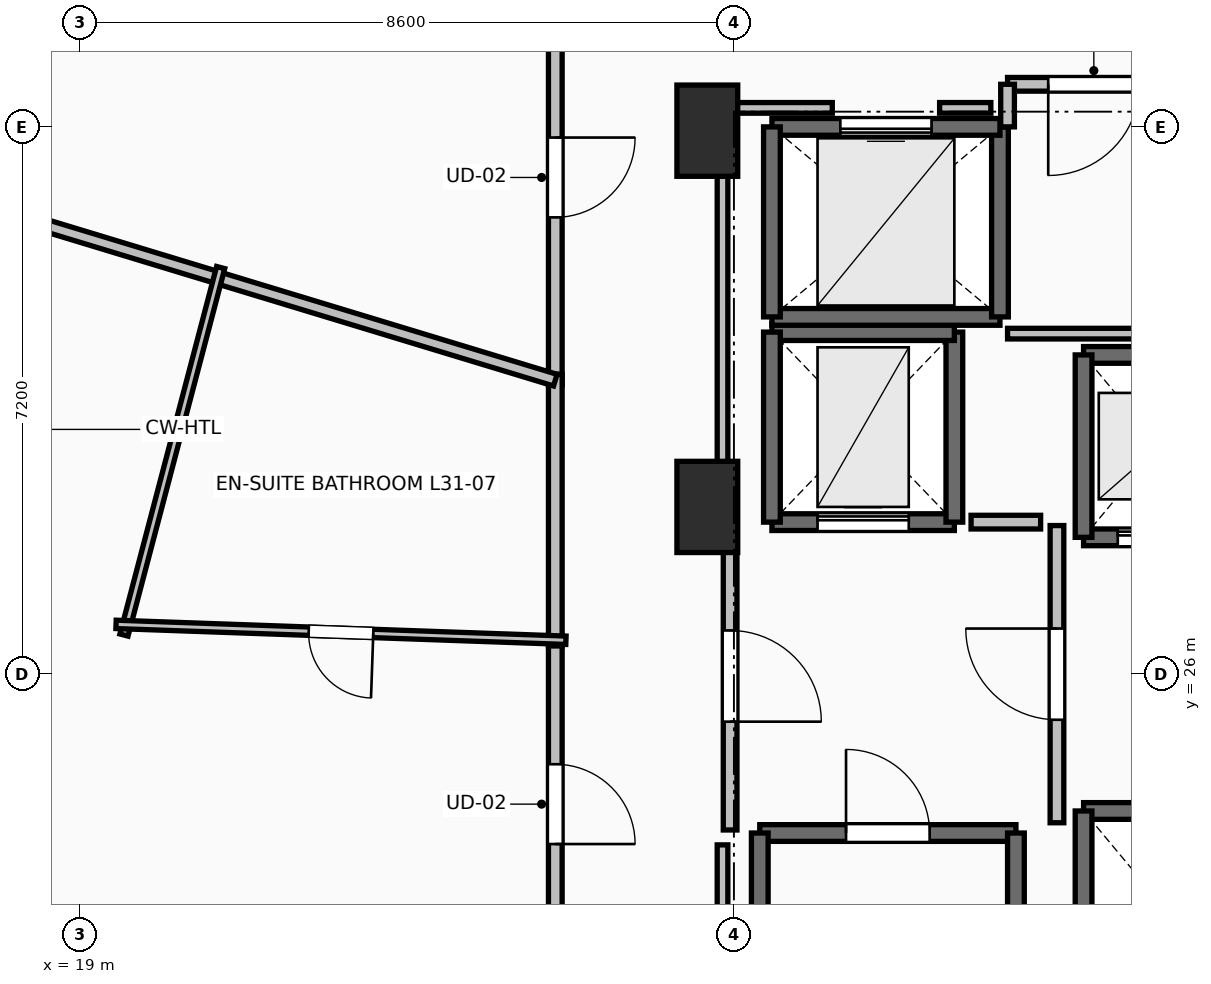
"""IFC4 building model, lengths in metres.
Left out: names, types, materials, properties, quantities, classifications, styles, units other than length and angle.
Written with IfcOpenShell. Run it as: python <this file> out.ifc"""

import sys

from ifc_helpers import new_model, si_unit, direction, frame, frame_2d, origin, origin_2d, place, context, subcontext, project, spatial, rectangle, extrude, element, fill, save


model = new_model("IFC4")
c1 = context("Model", 3, precision=1e-05, world=origin(), true_north=direction((0.0, 1.0)))
c2 = subcontext(c1, "Body", "Model", "MODEL_VIEW")
j1 = project(units=[si_unit("LENGTHUNIT", "METRE"), si_unit("PLANEANGLEUNIT", "RADIAN")], contexts=[c1])
p1 = place(None, origin())
s1 = spatial("IfcSite", under=j1, at=p1, CompositionType="ELEMENT")
p2 = place(p1, origin())
s2 = spatial("IfcBuilding", under=s1, at=p2, CompositionType="ELEMENT")
p3 = place(p2, frame((0.0, 0.0, 117.3)))
s3 = spatial("IfcBuildingStorey", under=s2, at=p3, CompositionType="ELEMENT", Elevation=117.3)
for number, where, z_axis, x_axis in (
    (1, (27.25, 28.2, 0.0), (0.0, 0.0, 1.0), (1.0, 0.0, 0.0)),
    (2, (27.25, 33.15, 0.0), (0.0, 0.0, 1.0), (1.0, 0.0, 0.0)),
):
    element("IfcColumn", number, at=place(p3, frame(where, z_axis=z_axis, x_axis=x_axis)), inside=s3, PredefinedType="PILASTER", context=c2, shape_type="SweptSolid", body=[
        extrude(rectangle(XDim=0.8, YDim=1.2, at=origin_2d()), origin(), (0.0, 0.0, 1.0), 3.5),
    ])
p4 = place(p3, frame((27.94, 23.91, 0.0), z_axis=(0.0, 0.0, 1.0), x_axis=(1.0, 0.0, 0.0)))
e3 = element("IfcWall", 3, at=p4, inside=s3, PredefinedType="SOLIDWALL", context=c2, shape_type="SweptSolid", body=[
    extrude(rectangle(XDim=3.37, YDim=0.22, at=frame_2d((1.685, 0.0))), origin(), (0.0, 0.0, 1.0), 3.24),
])
p5 = place(p4, frame((1.135, 0.0, 0.0)))
e4 = element("IfcOpeningElement", 4, at=p5, cuts=e3, PredefinedType="OPENING", context=c2, shape_type="SweptSolid", body=[
    extrude(rectangle(XDim=1.1, YDim=2.15, at=frame_2d((0.55, 1.075))), frame((0.0, 0.125, 0.0), z_axis=(0.0, -1.0, 0.0), x_axis=(1.0, 0.0, 0.0)), (0.0, 0.0, 1.0), 0.25),
])
for number, where, z_axis, x_axis in (
    (5, (31.31, 23.91, 0.0), (0.0, 0.0, 1.0), (0.0, -1.0, 0.0)),
    (6, (27.94, 16.49, 0.0), (0.0, 0.0, 1.0), (0.0, 1.0, 0.0)),
):
    element("IfcWall", number, at=place(p3, frame(where, z_axis=z_axis, x_axis=x_axis)), inside=s3, PredefinedType="SOLIDWALL", context=c2, shape_type="SweptSolid", body=[
        extrude(rectangle(XDim=7.42, YDim=0.22, at=frame_2d((3.71, 0.0))), origin(), (0.0, 0.0, 1.0), 3.24),
    ])
p6 = place(p3, frame((32.2, 27.8, 0.0), z_axis=(0.0, 0.0, 1.0), x_axis=(1.0, 0.0, 0.0)))
e7 = element("IfcWall", 7, at=p6, inside=s3, PredefinedType="SOLIDWALL", context=c2, shape_type="SweptSolid", body=[
    extrude(rectangle(XDim=2.0, YDim=0.22, at=frame_2d((1.0, 0.0))), origin(), (0.0, 0.0, 1.0), 3.24),
])
p7 = place(p6, frame((0.45, 0.0, 0.0)))
e8 = element("IfcOpeningElement", 8, at=p7, cuts=e7, PredefinedType="OPENING", context=c2, shape_type="SweptSolid", body=[
    extrude(rectangle(XDim=1.1, YDim=2.2, at=frame_2d((0.55, 1.1))), frame((0.0, 0.125, 0.0), z_axis=(0.0, -1.0, 0.0), x_axis=(1.0, 0.0, 0.0)), (0.0, 0.0, 1.0), 0.25),
])
p8 = place(p3, frame((34.2, 30.2, 0.0), z_axis=(0.0, 0.0, 1.0), x_axis=(-1.0, 0.0, 0.0)))
e9 = element("IfcWall", 9, at=p8, inside=s3, PredefinedType="SOLIDWALL", context=c2, shape_type="SweptSolid", body=[
    extrude(rectangle(XDim=2.0, YDim=0.22, at=frame_2d((1.0, 0.0))), origin(), (0.0, 0.0, 1.0), 3.24),
])
p9 = place(p3, frame((32.2, 30.2, 0.0), z_axis=(0.0, 0.0, 1.0), x_axis=(0.0, -1.0, 0.0)))
e10 = element("IfcWall", 10, at=p9, inside=s3, PredefinedType="SOLIDWALL", context=c2, shape_type="SweptSolid", body=[
    extrude(rectangle(XDim=2.4, YDim=0.22, at=frame_2d((1.2, 0.0))), origin(), (0.0, 0.0, 1.0), 3.24),
])
p10 = place(p3, frame((34.2, 24.2, 0.0), z_axis=(0.0, 0.0, 1.0), x_axis=(-1.0, 0.0, 0.0)))
e11 = element("IfcWall", 11, at=p10, inside=s3, PredefinedType="SOLIDWALL", context=c2, shape_type="SweptSolid", body=[
    extrude(rectangle(XDim=2.0, YDim=0.22, at=frame_2d((1.0, 0.0))), origin(), (0.0, 0.0, 1.0), 3.24),
])
p11 = place(p3, frame((32.2, 24.2, 0.0), z_axis=(0.0, 0.0, 1.0), x_axis=(0.0, -1.0, 0.0)))
e12 = element("IfcWall", 12, at=p11, inside=s3, PredefinedType="SOLIDWALL", context=c2, shape_type="SweptSolid", body=[
    extrude(rectangle(XDim=2.4, YDim=0.22, at=frame_2d((1.2, 0.0))), origin(), (0.0, 0.0, 1.0), 3.24),
])
p12 = place(p3, frame((28.1, 28.0, 0.0), z_axis=(0.0, 0.0, 1.0), x_axis=(1.0, 0.0, 0.0)))
e13 = element("IfcWall", 13, at=p12, inside=s3, PredefinedType="SHEAR", context=c2, shape_type="SweptSolid", body=[
    extrude(rectangle(XDim=2.4, YDim=0.22, at=frame_2d((1.2, 0.0))), origin(), (0.0, 0.0, 1.0), 3.24),
])
p13 = place(p12, frame((0.6, 0.0, 0.0)))
e14 = element("IfcOpeningElement", 14, at=p13, cuts=e13, PredefinedType="OPENING", context=c2, shape_type="SweptSolid", body=[
    extrude(rectangle(XDim=1.2, YDim=2.2, at=frame_2d((0.6, 1.1))), frame((0.0, 0.125, 0.0), z_axis=(0.0, -1.0, 0.0), x_axis=(1.0, 0.0, 0.0)), (0.0, 0.0, 1.0), 0.25),
])
p14 = place(p3, frame((30.5, 28.0, 0.0), z_axis=(0.0, 0.0, 1.0), x_axis=(0.0, 1.0, 0.0)))
e15 = element("IfcWall", 15, at=p14, inside=s3, PredefinedType="SHEAR", context=c2, shape_type="SweptSolid", body=[
    extrude(rectangle(XDim=2.5, YDim=0.22, at=frame_2d((1.25, 0.0))), origin(), (0.0, 0.0, 1.0), 3.24),
])
p15 = place(p3, frame((30.5, 30.5, 0.0), z_axis=(0.0, 0.0, 1.0), x_axis=(-1.0, 0.0, 0.0)))
e16 = element("IfcWall", 16, at=p15, inside=s3, PredefinedType="SHEAR", context=c2, shape_type="SweptSolid", body=[
    extrude(rectangle(XDim=2.4, YDim=0.22, at=frame_2d((1.2, 0.0))), origin(), (0.0, 0.0, 1.0), 3.24),
])
p16 = place(p3, frame((28.1, 30.5, 0.0), z_axis=(0.0, 0.0, 1.0), x_axis=(0.0, -1.0, 0.0)))
e17 = element("IfcWall", 17, at=p16, inside=s3, PredefinedType="SHEAR", context=c2, shape_type="SweptSolid", body=[
    extrude(rectangle(XDim=2.5, YDim=0.22, at=frame_2d((1.25, 0.0))), origin(), (0.0, 0.0, 1.0), 3.24),
])
p17 = place(p3, frame((28.1, 30.7, 0.0), z_axis=(0.0, 0.0, 1.0), x_axis=(1.0, 0.0, 0.0)))
e18 = element("IfcWall", 18, at=p17, inside=s3, PredefinedType="SOLIDWALL", context=c2, shape_type="SweptSolid", body=[
    extrude(rectangle(XDim=3.0, YDim=0.22, at=frame_2d((1.5, 0.0))), origin(), (0.0, 0.0, 1.0), 3.24),
])
p18 = place(p3, frame((31.1, 30.7, 0.0), z_axis=(0.0, 0.0, 1.0), x_axis=(0.0, 1.0, 0.0)))
e19 = element("IfcWall", 19, at=p18, inside=s3, PredefinedType="SOLIDWALL", context=c2, shape_type="SweptSolid", body=[
    extrude(rectangle(XDim=2.5, YDim=0.22, at=frame_2d((1.25, 0.0))), origin(), (0.0, 0.0, 1.0), 3.24),
])
p19 = place(p3, frame((31.1, 33.2, 0.0), z_axis=(0.0, 0.0, 1.0), x_axis=(-1.0, 0.0, 0.0)))
e20 = element("IfcWall", 20, at=p19, inside=s3, PredefinedType="SOLIDWALL", context=c2, shape_type="SweptSolid", body=[
    extrude(rectangle(XDim=3.0, YDim=0.22, at=frame_2d((1.5, 0.0))), origin(), (0.0, 0.0, 1.0), 3.24),
])
p20 = place(p19, frame((0.9, 0.0, 0.0)))
e21 = element("IfcOpeningElement", 21, at=p20, cuts=e20, PredefinedType="OPENING", context=c2, shape_type="SweptSolid", body=[
    extrude(rectangle(XDim=1.2, YDim=2.2, at=frame_2d((0.6, 1.1))), frame((0.0, 0.125, 0.0), z_axis=(0.0, -1.0, 0.0), x_axis=(1.0, 0.0, 0.0)), (0.0, 0.0, 1.0), 0.25),
])
p21 = place(p3, frame((28.1, 33.2, 0.0), z_axis=(0.0, 0.0, 1.0), x_axis=(0.0, -1.0, 0.0)))
e22 = element("IfcWall", 22, at=p21, inside=s3, PredefinedType="SOLIDWALL", context=c2, shape_type="SweptSolid", body=[
    extrude(rectangle(XDim=2.5, YDim=0.22, at=frame_2d((1.25, 0.0))), origin(), (0.0, 0.0, 1.0), 3.24),
])
p22 = place(p3, frame((31.85, 24.045, 0.0), z_axis=(0.0, 0.0, 1.0), x_axis=(0.0, 1.0, 0.0)))
e23 = element("IfcWall", 23, at=p22, inside=s3, PredefinedType="PARTITIONING", context=c2, shape_type="SweptSolid", body=[
    extrude(rectangle(XDim=3.91, YDim=0.18, at=frame_2d((1.955, 0.0))), origin(), (0.0, 0.0, 1.0), 3.24),
])
p23 = place(p22, frame((1.355, 0.0, 0.0)))
e24 = element("IfcOpeningElement", 24, at=p23, cuts=e23, PredefinedType="OPENING", context=c2, shape_type="SweptSolid", body=[
    extrude(rectangle(XDim=1.2, YDim=2.15, at=frame_2d((0.6, 1.075))), frame((0.0, 0.105, 0.0), z_axis=(0.0, -1.0, 0.0), x_axis=(1.0, 0.0, 0.0)), (0.0, 0.0, 1.0), 0.21),
])
p24 = place(p3, frame((27.55, 28.0, 0.0), z_axis=(0.0, 0.0, 1.0), x_axis=(0.0, -1.0, 0.0)))
e25 = element("IfcWall", 25, at=p24, inside=s3, PredefinedType="PARTITIONING", context=c2, shape_type="SweptSolid", body=[
    extrude(rectangle(XDim=4.05, YDim=0.18, at=frame_2d((2.025, 0.0))), origin(), (0.0, 0.0, 1.0), 3.24),
])
p25 = place(p24, frame((1.425, 0.0, 0.0)))
e26 = element("IfcOpeningElement", 26, at=p25, cuts=e25, PredefinedType="OPENING", context=c2, shape_type="SweptSolid", body=[
    extrude(rectangle(XDim=1.2, YDim=2.15, at=frame_2d((0.6, 1.075))), frame((0.0, 0.105, 0.0), z_axis=(0.0, -1.0, 0.0), x_axis=(1.0, 0.0, 0.0)), (0.0, 0.0, 1.0), 0.21),
])
p26 = place(p3, frame((33.47, 33.76, 0.0), z_axis=(0.0, 0.0, 1.0), x_axis=(-1.0, 0.0, 0.0)))
e27 = element("IfcWall", 27, at=p26, inside=s3, PredefinedType="PARTITIONING", context=c2, shape_type="SweptSolid", body=[
    extrude(rectangle(XDim=2.27, YDim=0.18, at=frame_2d((1.135, 0.0))), origin(), (0.0, 0.0, 1.0), 3.24),
])
p27 = place(p26, frame((0.535, 0.0, 0.0)))
e28 = element("IfcOpeningElement", 28, at=p27, cuts=e27, PredefinedType="OPENING", context=c2, shape_type="SweptSolid", body=[
    extrude(rectangle(XDim=1.2, YDim=2.15, at=frame_2d((0.6, 1.075))), frame((0.0, 0.105, 0.0), z_axis=(0.0, -1.0, 0.0), x_axis=(1.0, 0.0, 0.0)), (0.0, 0.0, 1.0), 0.21),
])
p28 = place(p3, frame((31.2, 33.76, 0.0), z_axis=(0.0, 0.0, 1.0), x_axis=(0.0, -1.0, 0.0)))
e29 = element("IfcWall", 29, at=p28, inside=s3, PredefinedType="PARTITIONING", context=c2, shape_type="SweptSolid", body=[
    extrude(rectangle(XDim=0.56, YDim=0.18, at=frame_2d((0.28, 0.0))), origin(), (0.0, 0.0, 1.0), 3.24),
])
p29 = place(p3, frame((25.25, 35.261, 0.0), z_axis=(0.0, 0.0, 1.0), x_axis=(0.0, -1.0, 0.0)))
e30 = element("IfcWall", 30, at=p29, inside=s3, PredefinedType="PARTITIONING", context=c2, shape_type="SweptSolid", body=[
    extrude(rectangle(XDim=5.453, YDim=0.18, at=frame_2d((2.727, 0.0))), origin(), (0.0, 0.0, 1.0), 2.432),
])
p30 = place(p29, frame((2.201, 0.0, 0.0)))
e31 = element("IfcOpeningElement", 31, at=p30, cuts=e30, PredefinedType="OPENING", context=c2, shape_type="SweptSolid", body=[
    extrude(rectangle(XDim=1.05, YDim=2.2, at=frame_2d((0.525, 1.1))), frame((0.0, 0.105, 0.0), z_axis=(0.0, -1.0, 0.0), x_axis=(1.0, 0.0, 0.0)), (0.0, 0.0, 1.0), 0.21),
])
p31 = place(p3, frame((25.25, 26.511, 0.0), z_axis=(0.0, 0.0, 1.0), x_axis=(0.0, -1.0, 0.0)))
e32 = element("IfcWall", 32, at=p31, inside=s3, PredefinedType="PARTITIONING", context=c2, shape_type="SweptSolid", body=[
    extrude(rectangle(XDim=4.442, YDim=0.18, at=frame_2d((2.221, 0.0))), origin(), (0.0, 0.0, 1.0), 3.24),
])
p32 = place(p31, frame((1.696, 0.0, 0.0)))
e33 = element("IfcOpeningElement", 33, at=p32, cuts=e32, PredefinedType="OPENING", context=c2, shape_type="SweptSolid", body=[
    extrude(rectangle(XDim=1.05, YDim=2.2, at=frame_2d((0.525, 1.1))), frame((0.0, 0.105, 0.0), z_axis=(0.0, -1.0, 0.0), x_axis=(1.0, 0.0, 0.0)), (0.0, 0.0, 1.0), 0.21),
])
p33 = place(p3, frame((25.25, 29.948, 0.0), z_axis=(0.0, 0.0, 1.0), x_axis=(0.0, -1.0, 0.0)))
e34 = element("IfcWall", 34, at=p33, inside=s3, PredefinedType="PARTITIONING", context=c2, shape_type="SweptSolid", body=[
    extrude(rectangle(XDim=3.577, YDim=0.18, at=frame_2d((1.789, 0.0))), origin(), (0.0, 0.0, 1.0), 2.432),
])
p34 = place(p3, frame((13.663, 33.383, 0.0), z_axis=(0.0, 0.0, 1.0), x_axis=(0.956933802543, -0.290306213422, 0.0)))
e35 = element("IfcWall", 35, at=p34, inside=s3, PredefinedType="PARTITIONING", context=c2, shape_type="SweptSolid", body=[
    extrude(rectangle(XDim=12.108, YDim=0.16, at=frame_2d((6.054, 0.0))), origin(), (0.0, 0.0, 1.0), 2.432),
])
p35 = place(p3, frame((19.575, 26.515, 0.0), z_axis=(0.0, 0.0, 1.0), x_axis=(0.254478876497, 0.967078332617, 0.0)))
e36 = element("IfcWall", 36, at=p35, inside=s3, PredefinedType="PARTITIONING", context=c2, shape_type="SweptSolid", body=[
    extrude(rectangle(XDim=4.999, YDim=0.11, at=frame_2d((2.5, 0.0))), origin(), (0.0, 0.0, 1.0), 2.432),
])
p36 = place(p3, frame((25.39, 26.446, 0.0), z_axis=(0.0, 0.0, 1.0), x_axis=(-0.999378666741, 0.03524599926, 0.0)))
e37 = element("IfcWall", 37, at=p36, inside=s3, PredefinedType="PARTITIONING", context=c2, shape_type="SweptSolid", body=[
    extrude(rectangle(XDim=5.922, YDim=0.11, at=frame_2d((2.961, 0.0))), origin(), (0.0, 0.0, 1.0), 2.432),
])
p37 = place(p36, frame((2.536, 0.0, 0.0)))
e38 = element("IfcOpeningElement", 38, at=p37, cuts=e37, PredefinedType="OPENING", context=c2, shape_type="SweptSolid", body=[
    extrude(rectangle(XDim=0.85, YDim=2.1, at=frame_2d((0.425, 1.05))), frame((0.0, 0.07, 0.0), z_axis=(0.0, -1.0, 0.0), x_axis=(1.0, 0.0, 0.0)), (0.0, 0.0, 1.0), 0.14),
])
p38 = place(p3, frame((31.635, 28.0, 0.0), z_axis=(0.0, 0.0, 1.0), x_axis=(-1.0, 0.0, 0.0)))
e39 = element("IfcWall", 39, at=p38, inside=s3, PredefinedType="PARTITIONING", context=c2, shape_type="SweptSolid", body=[
    extrude(rectangle(XDim=0.915, YDim=0.18, at=frame_2d((0.458, 0.0))), origin(), (0.0, 0.0, 1.0), 3.24),
])
p39 = place(p3, frame((31.2, 30.48, 0.0), z_axis=(0.0, 0.0, 1.0), x_axis=(1.0, 0.0, 0.0)))
e40 = element("IfcWall", 40, at=p39, inside=s3, PredefinedType="PARTITIONING", context=c2, shape_type="SweptSolid", body=[
    extrude(rectangle(XDim=2.05, YDim=0.14, at=frame_2d((1.025, 0.0))), origin(), (0.0, 0.0, 1.0), 3.24),
])
p40 = place(p3, frame((27.45, 16.24, 0.0), z_axis=(0.0, 0.0, 1.0), x_axis=(0.0, 1.0, 0.0)))
e41 = element("IfcWall", 41, at=p40, inside=s3, PredefinedType="PARTITIONING", context=c2, shape_type="SweptSolid", body=[
    extrude(rectangle(XDim=7.514, YDim=0.14, at=frame_2d((3.757, 0.0))), origin(), (0.0, 0.0, 1.0), 2.432),
])
p41 = place(p3, frame((27.45, 28.196, 0.0), z_axis=(0.0, 0.0, 1.0), x_axis=(0.0, 1.0, 0.0)))
e42 = element("IfcWall", 42, at=p41, inside=s3, PredefinedType="PARTITIONING", context=c2, shape_type="SweptSolid", body=[
    extrude(rectangle(XDim=5.254, YDim=0.14, at=frame_2d((2.627, 0.0))), origin(), (0.0, 0.0, 1.0), 2.432),
])
p42 = place(p3, frame((27.45, 33.45, 0.0), z_axis=(0.0, 0.0, 1.0), x_axis=(1.0, 0.0, 0.0)))
e43 = element("IfcWall", 43, at=p42, inside=s3, PredefinedType="PARTITIONING", context=c2, shape_type="SweptSolid", body=[
    extrude(rectangle(XDim=1.444, YDim=0.14, at=frame_2d((0.722, 0.0))), origin(), (0.0, 0.0, 1.0), 2.432),
])
p43 = place(p3, frame((30.306, 33.45, 0.0), z_axis=(0.0, 0.0, 1.0), x_axis=(1.0, 0.0, 0.0)))
e44 = element("IfcWall", 44, at=p43, inside=s3, PredefinedType="PARTITIONING", context=c2, shape_type="SweptSolid", body=[
    extrude(rectangle(XDim=0.674, YDim=0.14, at=frame_2d((0.337, 0.0))), origin(), (0.0, 0.0, 1.0), 3.24),
])
p44 = place(p5, origin())
e45 = element("IfcDoor", 45, at=p44, inside=s3, OperationType="SINGLE_SWING_LEFT", PredefinedType="DOOR", context=c2, shape_type="SweptSolid", body=[
    extrude(rectangle(XDim=1.1, YDim=2.15, at=frame_2d((0.55, 1.075))), frame((0.0, 0.025, 0.0), z_axis=(0.0, -1.0, 0.0), x_axis=(1.0, 0.0, 0.0)), (0.0, 0.0, 1.0), 0.05),
])
fill(e4, e45)
p45 = place(p7, origin())
e46 = element("IfcDoor", 46, at=p45, inside=s3, OperationType="SLIDING_TO_LEFT", PredefinedType="DOOR", context=c2, shape_type="SweptSolid", body=[
    extrude(rectangle(XDim=1.1, YDim=2.2, at=frame_2d((0.55, 1.1))), frame((0.0, 0.025, 0.0), z_axis=(0.0, -1.0, 0.0), x_axis=(1.0, 0.0, 0.0)), (0.0, 0.0, 1.0), 0.05),
])
fill(e8, e46)
p46 = place(p13, origin())
e47 = element("IfcDoor", 47, at=p46, inside=s3, OperationType="SLIDING_TO_LEFT", PredefinedType="DOOR", context=c2, shape_type="SweptSolid", body=[
    extrude(rectangle(XDim=1.2, YDim=2.2, at=frame_2d((0.6, 1.1))), frame((0.0, 0.025, 0.0), z_axis=(0.0, -1.0, 0.0), x_axis=(1.0, 0.0, 0.0)), (0.0, 0.0, 1.0), 0.05),
])
fill(e14, e47)
p47 = place(p20, origin())
e48 = element("IfcDoor", 48, at=p47, inside=s3, OperationType="SLIDING_TO_LEFT", PredefinedType="DOOR", context=c2, shape_type="SweptSolid", body=[
    extrude(rectangle(XDim=1.2, YDim=2.2, at=frame_2d((0.6, 1.1))), frame((0.0, 0.025, 0.0), z_axis=(0.0, -1.0, 0.0), x_axis=(1.0, 0.0, 0.0)), (0.0, 0.0, 1.0), 0.05),
])
fill(e21, e48)
p48 = place(p23, origin())
e49 = element("IfcDoor", 49, at=p48, inside=s3, OperationType="SINGLE_SWING_RIGHT", PredefinedType="DOOR", context=c2, shape_type="SweptSolid", body=[
    extrude(rectangle(XDim=1.2, YDim=2.15, at=frame_2d((0.6, 1.075))), frame((0.0, 0.025, 0.0), z_axis=(0.0, -1.0, 0.0), x_axis=(1.0, 0.0, 0.0)), (0.0, 0.0, 1.0), 0.05),
])
fill(e24, e49)
p49 = place(p25, origin())
e50 = element("IfcDoor", 50, at=p49, inside=s3, OperationType="SINGLE_SWING_RIGHT", PredefinedType="DOOR", context=c2, shape_type="SweptSolid", body=[
    extrude(rectangle(XDim=1.2, YDim=2.15, at=frame_2d((0.6, 1.075))), frame((0.0, 0.025, 0.0), z_axis=(0.0, -1.0, 0.0), x_axis=(1.0, 0.0, 0.0)), (0.0, 0.0, 1.0), 0.05),
])
fill(e26, e50)
p50 = place(p27, origin())
e51 = element("IfcDoor", 51, at=p50, inside=s3, OperationType="SINGLE_SWING_RIGHT", PredefinedType="DOOR", context=c2, shape_type="SweptSolid", body=[
    extrude(rectangle(XDim=1.2, YDim=2.15, at=frame_2d((0.6, 1.075))), frame((0.0, 0.025, 0.0), z_axis=(0.0, -1.0, 0.0), x_axis=(1.0, 0.0, 0.0)), (0.0, 0.0, 1.0), 0.05),
])
fill(e28, e51)
p51 = place(p30, origin())
e52 = element("IfcDoor", 52, at=p51, inside=s3, OperationType="SINGLE_SWING_LEFT", PredefinedType="DOOR", context=c2, shape_type="SweptSolid", body=[
    extrude(rectangle(XDim=1.05, YDim=2.2, at=frame_2d((0.525, 1.1))), frame((0.0, 0.025, 0.0), z_axis=(0.0, -1.0, 0.0), x_axis=(1.0, 0.0, 0.0)), (0.0, 0.0, 1.0), 0.05),
])
fill(e31, e52)
p52 = place(p32, origin())
e53 = element("IfcDoor", 53, at=p52, inside=s3, OperationType="SINGLE_SWING_RIGHT", PredefinedType="DOOR", context=c2, shape_type="SweptSolid", body=[
    extrude(rectangle(XDim=1.05, YDim=2.2, at=frame_2d((0.525, 1.1))), frame((0.0, 0.025, 0.0), z_axis=(0.0, -1.0, 0.0), x_axis=(1.0, 0.0, 0.0)), (0.0, 0.0, 1.0), 0.05),
])
fill(e33, e53)
p53 = place(p37, origin())
e54 = element("IfcDoor", 54, at=p53, inside=s3, OperationType="SINGLE_SWING_LEFT", PredefinedType="DOOR", context=c2, shape_type="SweptSolid", body=[
    extrude(rectangle(XDim=0.85, YDim=2.1, at=frame_2d((0.425, 1.05))), frame((0.0, 0.025, 0.0), z_axis=(0.0, -1.0, 0.0), x_axis=(1.0, 0.0, 0.0)), (0.0, 0.0, 1.0), 0.05),
])
fill(e38, e54)
save(model, sys.argv[1])
